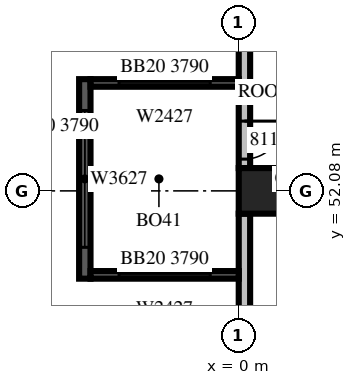
"""IFC4 building model, lengths in metres.
Left out: names, types, materials, properties, quantities, classifications, styles, units other than length and angle.
Written with IfcOpenShell. Run it as: python <this file> out.ifc"""

import sys

from ifc_helpers import new_model, si_unit, direction, frame, frame_2d, origin, origin_2d, place, context, subcontext, project, spatial, rectangle, extrude, source, transform, mapped, element, fill, save


model = new_model("IFC4")
c1 = context("Model", 3, precision=1e-05, world=origin(), true_north=direction((0.0, 1.0)))
c2 = subcontext(c1, "Body", "Model", "MODEL_VIEW")
j1 = project(units=[si_unit("LENGTHUNIT", "METRE"), si_unit("PLANEANGLEUNIT", "RADIAN")], contexts=[c1])
p1 = place(None, origin())
s1 = spatial("IfcSite", under=j1, at=p1, CompositionType="ELEMENT")
p2 = place(p1, origin())
s2 = spatial("IfcBuilding", under=s1, at=p2, CompositionType="ELEMENT")
p3 = place(p2, frame((0.0, 0.0, 57.3)))
s3 = spatial("IfcBuildingStorey", under=s2, at=p3, CompositionType="ELEMENT", Elevation=57.3)
m1 = source(origin(), c2, "Body", "SweptSolid", [
    extrude(rectangle(XDim=1.2, YDim=1.2, at=origin_2d()), origin(), (0.0, 0.0, 1.0), 4.2),
])
p4 = place(p3, frame((0.6, 52.08, 0.0), z_axis=(0.0, 0.0, 1.0), x_axis=(1.0, 0.0, 0.0)))
e1 = element("IfcColumn", 1, at=p4, inside=s3, PredefinedType="COLUMN", context=c2, shape_type="MappedRepresentation", body=[
    mapped(m1, transform((0.0, 0.0, 0.0), scale=1.0)),
])
m2 = source(origin(), c2, "Body", "SweptSolid", [
    extrude(rectangle(XDim=4.68, YDim=0.3, at=frame_2d((2.34, 0.0))), origin(), (0.0, 0.0, 1.0), 3.8),
])
p5 = place(p3, frame((0.15, 57.36, 0.0), z_axis=(0.0, 0.0, 1.0), x_axis=(0.0, -1.0, 0.0)))
e2 = element("IfcWall", 2, at=p5, inside=s3, PredefinedType="STANDARD", context=c2, shape_type="MappedRepresentation", body=[
    mapped(m2, transform((0.0, 0.0, 0.0), scale=1.0)),
])
m3 = source(origin(), c2, "Body", "SweptSolid", [
    extrude(rectangle(XDim=1.2, YDim=2.7, at=frame_2d((0.6, 1.35))), frame((0.0, 0.16, 0.0), z_axis=(0.0, -1.0, 0.0), x_axis=(1.0, 0.0, 0.0)), (0.0, 0.0, 1.0), 0.32),
])
p6 = place(p5, frame((0.165, 0.0, 0.6)))
e3 = element("IfcOpeningElement", 3, at=p6, cuts=e2, PredefinedType="OPENING", context=c2, shape_type="MappedRepresentation", body=[
    mapped(m3, transform((0.0, 0.0, 0.0), scale=1.0)),
])
m4 = source(origin(), c2, "Body", "SweptSolid", [
    extrude(rectangle(XDim=1.0, YDim=2.1, at=frame_2d((0.5, 1.05))), frame((0.0, 0.16, 0.0), z_axis=(0.0, -1.0, 0.0), x_axis=(1.0, 0.0, 0.0)), (0.0, 0.0, 1.0), 0.32),
])
p7 = place(p5, frame((3.444, 0.0, 0.0)))
e4 = element("IfcOpeningElement", 4, at=p7, cuts=e2, PredefinedType="OPENING", context=c2, shape_type="MappedRepresentation", body=[
    mapped(m4, transform((0.0, 0.0, 0.0), scale=1.0)),
])
p8 = place(p3, frame((0.15, 51.48, 0.0), z_axis=(0.0, 0.0, 1.0), x_axis=(0.0, -1.0, 0.0)))
e5 = element("IfcWall", 5, at=p8, inside=s3, PredefinedType="STANDARD", context=c2, shape_type="MappedRepresentation", body=[
    mapped(m2, transform((0.0, 0.0, 0.0), scale=1.0)),
])
m5 = source(origin(), c2, "Body", "SweptSolid", [
    extrude(rectangle(XDim=5.25, YDim=0.3, at=frame_2d((2.625, 0.0))), origin(), (0.0, 0.0, 1.0), 3.79),
])
p9 = place(p3, frame((-4.05, 55.02, 0.0), z_axis=(0.0, 0.0, 1.0), x_axis=(0.0, -1.0, 0.0)))
e6 = element("IfcWall", 6, at=p9, inside=s3, PredefinedType="SOLIDWALL", context=c2, shape_type="MappedRepresentation", body=[
    mapped(m5, transform((0.0, 0.0, 0.0), scale=1.0)),
])
m6 = source(origin(), c2, "Body", "SweptSolid", [
    extrude(rectangle(XDim=3.6, YDim=2.7, at=frame_2d((1.8, 1.35))), frame((0.0, 0.16, 0.0), z_axis=(0.0, -1.0, 0.0), x_axis=(1.0, 0.0, 0.0)), (0.0, 0.0, 1.0), 0.32),
])
p10 = place(p9, frame((0.825, 0.0, 0.6)))
e7 = element("IfcOpeningElement", 7, at=p10, cuts=e6, PredefinedType="OPENING", context=c2, shape_type="MappedRepresentation", body=[
    mapped(m6, transform((0.0, 0.0, 0.0), scale=1.0)),
])
m7 = source(origin(), c2, "Body", "SweptSolid", [
    extrude(rectangle(XDim=3.9, YDim=0.2, at=frame_2d((1.95, 0.0))), origin(), (0.0, 0.0, 1.0), 3.79),
])
p11 = place(p3, frame((0.0, 54.92, 0.0), z_axis=(0.0, 0.0, 1.0), x_axis=(-1.0, 0.0, 0.0)))
e8 = element("IfcWall", 8, at=p11, inside=s3, PredefinedType="SOLIDWALL", context=c2, shape_type="MappedRepresentation", body=[
    mapped(m7, transform((0.0, 0.0, 0.0), scale=1.0)),
])
m8 = source(origin(), c2, "Body", "SweptSolid", [
    extrude(rectangle(XDim=2.4, YDim=2.7, at=frame_2d((1.2, 1.35))), frame((0.0, 0.11, 0.0), z_axis=(0.0, -1.0, 0.0), x_axis=(1.0, 0.0, 0.0)), (0.0, 0.0, 1.0), 0.22),
])
p12 = place(p11, frame((0.75, 0.0, 0.6)))
e9 = element("IfcOpeningElement", 9, at=p12, cuts=e8, PredefinedType="OPENING", context=c2, shape_type="MappedRepresentation", body=[
    mapped(m8, transform((0.0, 0.0, 0.0), scale=1.0)),
])
p13 = place(p3, frame((0.0, 49.87, 0.0), z_axis=(0.0, 0.0, 1.0), x_axis=(-1.0, 0.0, 0.0)))
e10 = element("IfcWall", 10, at=p13, inside=s3, PredefinedType="SOLIDWALL", context=c2, shape_type="MappedRepresentation", body=[
    mapped(m7, transform((0.0, 0.0, 0.0), scale=1.0)),
])
p14 = place(p13, frame((0.75, 0.0, 0.6)))
e11 = element("IfcOpeningElement", 11, at=p14, cuts=e10, PredefinedType="OPENING", context=c2, shape_type="MappedRepresentation", body=[
    mapped(m8, transform((0.0, 0.0, 0.0), scale=1.0)),
])
m9 = source(origin(), c2, "Body", "SweptSolid", [
    extrude(rectangle(XDim=3.6, YDim=2.7, at=frame_2d((1.8, 1.35))), frame((0.0, 0.03, 0.0), z_axis=(0.0, -1.0, 0.0), x_axis=(1.0, 0.0, 0.0)), (0.0, 0.0, 1.0), 0.06),
])
p15 = place(p10, origin())
e12 = element("IfcWindow", 12, at=p15, inside=s3, PartitioningType="SINGLE_PANEL", PredefinedType="WINDOW", context=c2, shape_type="MappedRepresentation", body=[
    mapped(m9, transform((0.0, 0.0, 0.0), scale=1.0)),
])
fill(e7, e12)
m10 = source(origin(), c2, "Body", "SweptSolid", [
    extrude(rectangle(XDim=2.4, YDim=2.7, at=frame_2d((1.2, 1.35))), frame((0.0, 0.03, 0.0), z_axis=(0.0, -1.0, 0.0), x_axis=(1.0, 0.0, 0.0)), (0.0, 0.0, 1.0), 0.06),
])
p16 = place(p12, origin())
e13 = element("IfcWindow", 13, at=p16, inside=s3, PartitioningType="SINGLE_PANEL", PredefinedType="WINDOW", context=c2, shape_type="MappedRepresentation", body=[
    mapped(m10, transform((0.0, 0.0, 0.0), scale=1.0)),
])
fill(e9, e13)
p17 = place(p14, origin())
e14 = element("IfcWindow", 14, at=p17, inside=s3, PartitioningType="SINGLE_PANEL", PredefinedType="WINDOW", context=c2, shape_type="MappedRepresentation", body=[
    mapped(m10, transform((0.0, 0.0, 0.0), scale=1.0)),
])
fill(e11, e14)
m11 = source(origin(), c2, "Body", "SweptSolid", [
    extrude(rectangle(XDim=1.0, YDim=2.1, at=frame_2d((0.5, 1.05))), frame((0.0, 0.025, 0.0), z_axis=(0.0, -1.0, 0.0), x_axis=(1.0, 0.0, 0.0)), (0.0, 0.0, 1.0), 0.05),
])
p18 = place(p7, origin())
e15 = element("IfcDoor", 15, at=p18, inside=s3, OperationType="SINGLE_SWING_LEFT", PredefinedType="DOOR", context=c2, shape_type="MappedRepresentation", body=[
    mapped(m11, transform((0.0, 0.0, 0.0), scale=1.0)),
])
fill(e4, e15)
save(model, sys.argv[1])
